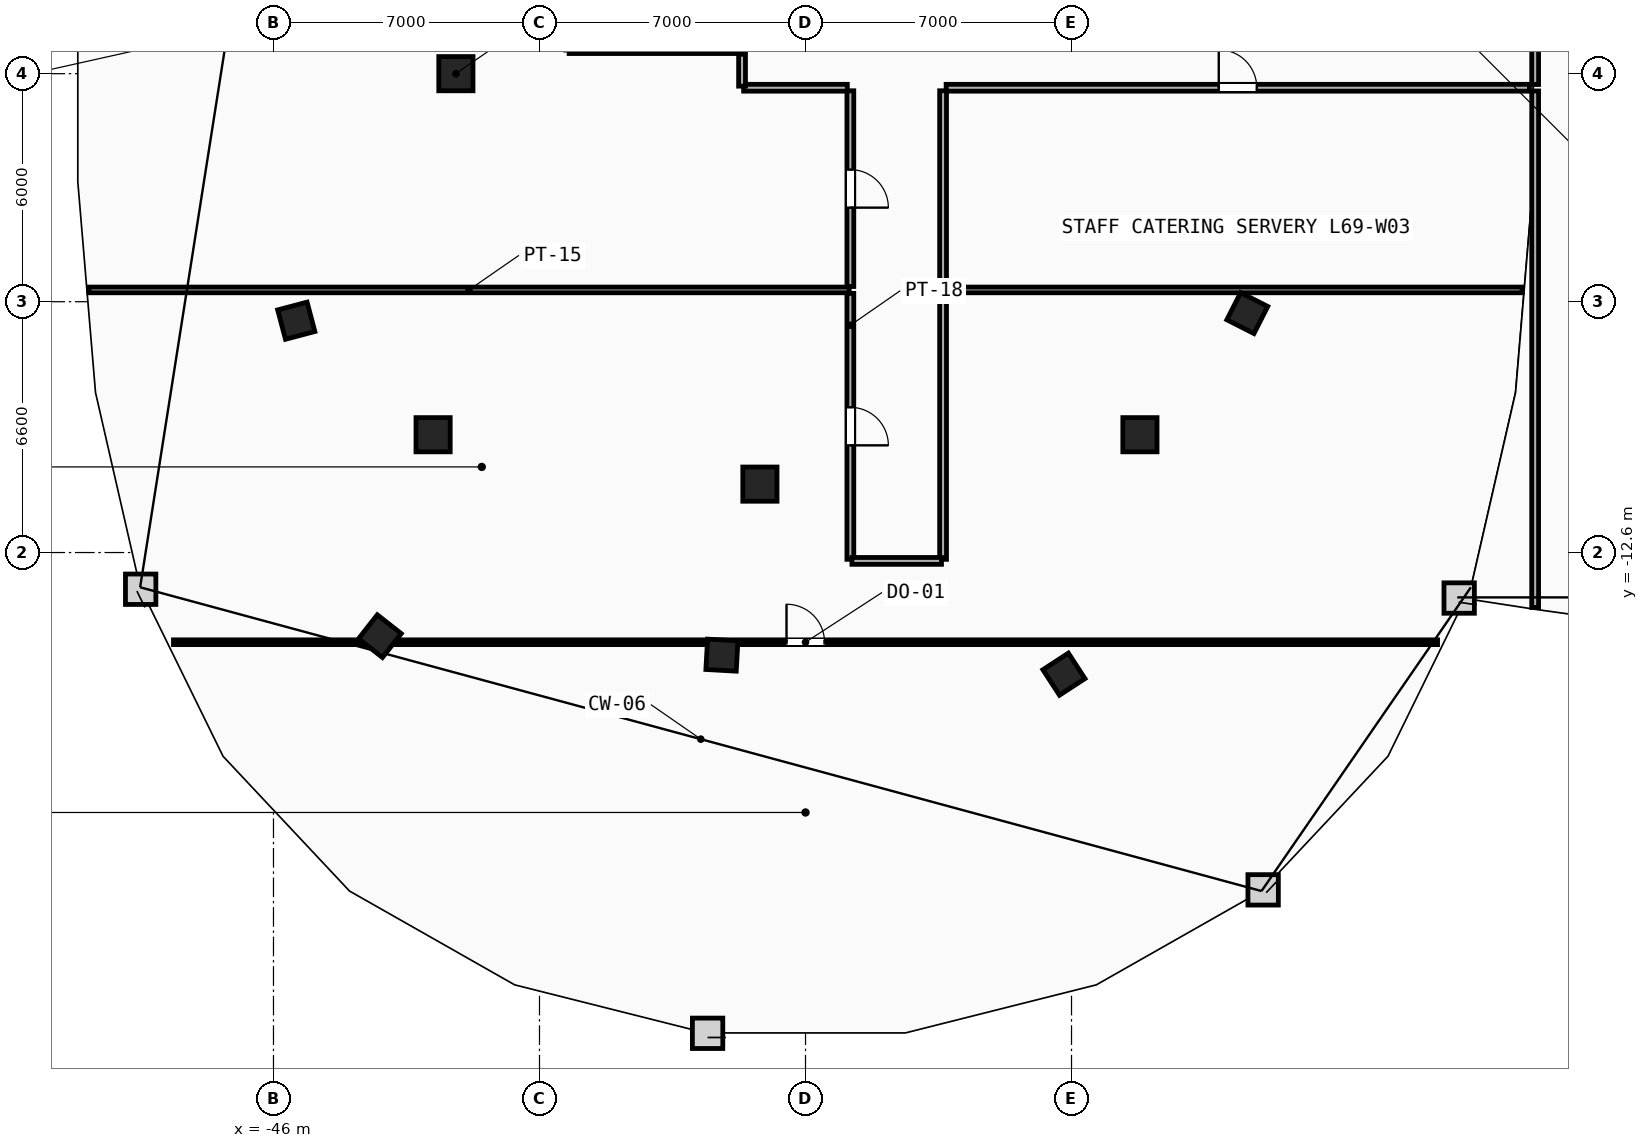
"""IFC4 building model, lengths in metres.
Left out: names, types, materials, properties, quantities, classifications, styles, units other than length and angle.
Written with IfcOpenShell. Run it as: python <this file> out.ifc"""

import sys

from ifc_helpers import new_model, si_unit, direction, frame, frame_2d, origin, origin_2d, place, context, subcontext, project, spatial, rectangle, extrude, element, fill, save


model = new_model("IFC4")
c1 = context("Model", 3, precision=1e-05, world=origin(), true_north=direction((0.0, 1.0)))
c2 = subcontext(c1, "Body", "Model", "MODEL_VIEW")
j1 = project(units=[si_unit("LENGTHUNIT", "METRE"), si_unit("PLANEANGLEUNIT", "RADIAN")], contexts=[c1])
p1 = place(None, origin())
s1 = spatial("IfcSite", under=j1, at=p1, CompositionType="ELEMENT")
p2 = place(p1, origin())
s2 = spatial("IfcBuilding", under=s1, at=p2, CompositionType="ELEMENT")
p3 = place(p2, frame((0.0, 0.0, 261.2)))
s3 = spatial("IfcBuildingStorey", under=s2, at=p3, CompositionType="ELEMENT", Elevation=261.2)
for number, where, z_axis, x_axis in (
    (1, (-41.2, 0.0, 0.0), (0.0, 0.0, 1.0), (1.0, 0.0, 0.0)),
    (2, (-41.8, -9.5, 0.0), (0.0, 0.0, 1.0), (1.0, 0.0, 0.0)),
    (3, (-33.2, -10.8, 0.0), (0.0, 0.0, 1.0), (1.0, 0.0, 0.0)),
    (4, (-23.2, -9.5, 0.0), (0.0, 0.0, 1.0), (1.0, 0.0, 0.0)),
):
    element("IfcColumn", number, at=place(p3, frame(where, z_axis=z_axis, x_axis=x_axis)), inside=s3, PredefinedType="COLUMN", context=c2, shape_type="SweptSolid", body=[
        extrude(rectangle(XDim=0.9, YDim=0.9, at=origin_2d()), origin(), (0.0, 0.0, 1.0), 3.6),
    ])
for number, where, z_axis, x_axis in (
    (5, (-45.4, -6.5, 0.0), (0.0, 0.0, 1.0), (0.256, -0.967, 0.0)),
    (6, (-43.2, -14.8, 0.0), (0.0, 0.0, 1.0), (0.786, -0.618, 0.0)),
    (7, (-34.2, -15.3, 0.0), (0.0, 0.0, 1.0), (0.998, -0.055, 0.0)),
    (8, (-25.2, -15.8, 0.0), (0.0, 0.0, 1.0), (0.838, 0.546, 0.0)),
    (9, (-20.375, -6.3, 0.0), (0.0, 0.0, 1.0), (0.453, 0.892, 0.0)),
):
    element("IfcColumn", number, at=place(p3, frame(where, z_axis=z_axis, x_axis=x_axis)), inside=s3, PredefinedType="COLUMN", context=c2, shape_type="SweptSolid", body=[
        extrude(rectangle(XDim=0.8, YDim=0.8, at=origin_2d()), origin(), (0.0, 0.0, 1.0), 3.6),
    ])
p4 = place(p3, frame((-38.22, 0.6, 0.0), z_axis=(0.0, 0.0, 1.0), x_axis=(1.0, 0.0, 0.0)))
e10 = element("IfcWall", 10, at=p4, inside=s3, PredefinedType="PARTITIONING", context=c2, shape_type="SweptSolid", body=[
    extrude(rectangle(XDim=4.48, YDim=0.14, at=frame_2d((2.24, 0.0))), origin(), (0.0, 0.0, 1.0), 3.34),
])
p5 = place(p3, frame((-50.86, -5.69, 0.0), z_axis=(0.0, 0.0, 1.0), x_axis=(1.0, 0.0, 0.0)))
e11 = element("IfcWall", 11, at=p5, inside=s3, PredefinedType="PARTITIONING", context=c2, shape_type="SweptSolid", body=[
    extrude(rectangle(XDim=20.01, YDim=0.15, at=frame_2d((10.005, 0.0))), origin(), (0.0, 0.0, 1.0), 3.34),
])
p6 = place(p3, frame((-28.35, -5.69, 0.0), z_axis=(0.0, 0.0, 1.0), x_axis=(1.0, 0.0, 0.0)))
e12 = element("IfcWall", 12, at=p6, inside=s3, PredefinedType="PARTITIONING", context=c2, shape_type="SweptSolid", body=[
    extrude(rectangle(XDim=15.21, YDim=0.15, at=frame_2d((7.605, 0.0))), origin(), (0.0, 0.0, 1.0), 3.34),
])
p7 = place(p3, frame((-30.82, -5.78, 0.0), z_axis=(0.0, 0.0, 1.0), x_axis=(0.0, -1.0, 0.0)))
e13 = element("IfcWall", 13, at=p7, inside=s3, PredefinedType="PARTITIONING", context=c2, shape_type="SweptSolid", body=[
    extrude(rectangle(XDim=6.999, YDim=0.18, at=frame_2d((3.499, 0.0))), origin(), (0.0, 0.0, 1.0), 3.34),
])
p8 = place(p7, frame((2.999, 0.0, 0.0)))
e14 = element("IfcOpeningElement", 14, at=p8, cuts=e13, PredefinedType="OPENING", context=c2, shape_type="SweptSolid", body=[
    extrude(rectangle(XDim=1.0, YDim=2.15, at=frame_2d((0.5, 1.075))), frame((0.0, 0.1, 0.0), z_axis=(0.0, -1.0, 0.0), x_axis=(1.0, 0.0, 0.0)), (0.0, 0.0, 1.0), 0.2),
])
p9 = place(p3, frame((-28.38, -12.779, 0.0), z_axis=(0.0, 0.0, 1.0), x_axis=(0.0, 1.0, 0.0)))
e15 = element("IfcWall", 15, at=p9, inside=s3, PredefinedType="PARTITIONING", context=c2, shape_type="SweptSolid", body=[
    extrude(rectangle(XDim=6.999, YDim=0.18, at=frame_2d((3.499, 0.0))), origin(), (0.0, 0.0, 1.0), 3.34),
])
p10 = place(p3, frame((-30.779, -12.82, 0.0), z_axis=(0.0, 0.0, 1.0), x_axis=(1.0, 0.0, 0.0)))
e16 = element("IfcWall", 16, at=p10, inside=s3, PredefinedType="PARTITIONING", context=c2, shape_type="SweptSolid", body=[
    extrude(rectangle(XDim=2.357, YDim=0.18, at=frame_2d((1.179, 0.0))), origin(), (0.0, 0.0, 1.0), 3.34),
])
p11 = place(p3, frame((-28.3, -0.37, 0.0), z_axis=(0.0, 0.0, 1.0), x_axis=(1.0, 0.0, 0.0)))
e17 = element("IfcWall", 17, at=p11, inside=s3, PredefinedType="PARTITIONING", context=c2, shape_type="SweptSolid", body=[
    extrude(rectangle(XDim=15.349, YDim=0.18, at=frame_2d((7.675, 0.0))), origin(), (0.0, 0.0, 1.0), 3.34),
])
p12 = place(p11, frame((7.175, 0.0, 0.0)))
e18 = element("IfcOpeningElement", 18, at=p12, cuts=e17, PredefinedType="OPENING", context=c2, shape_type="SweptSolid", body=[
    extrude(rectangle(XDim=1.0, YDim=2.15, at=frame_2d((0.5, 1.075))), frame((0.0, 0.1, 0.0), z_axis=(0.0, -1.0, 0.0), x_axis=(1.0, 0.0, 0.0)), (0.0, 0.0, 1.0), 0.2),
])
p13 = place(p3, frame((-28.38, -5.6, 0.0), z_axis=(0.0, 0.0, 1.0), x_axis=(0.0, 1.0, 0.0)))
e19 = element("IfcWall", 19, at=p13, inside=s3, PredefinedType="PARTITIONING", context=c2, shape_type="SweptSolid", body=[
    extrude(rectangle(XDim=5.15, YDim=0.18, at=frame_2d((2.575, 0.0))), origin(), (0.0, 0.0, 1.0), 3.34),
])
p14 = place(p3, frame((-30.82, -0.45, 0.0), z_axis=(0.0, 0.0, 1.0), x_axis=(0.0, -1.0, 0.0)))
e20 = element("IfcWall", 20, at=p14, inside=s3, PredefinedType="PARTITIONING", context=c2, shape_type="SweptSolid", body=[
    extrude(rectangle(XDim=5.15, YDim=0.18, at=frame_2d((2.575, 0.0))), origin(), (0.0, 0.0, 1.0), 3.34),
])
p15 = place(p14, frame((2.075, 0.0, 0.0)))
e21 = element("IfcOpeningElement", 21, at=p15, cuts=e20, PredefinedType="OPENING", context=c2, shape_type="SweptSolid", body=[
    extrude(rectangle(XDim=1.0, YDim=2.15, at=frame_2d((0.5, 1.075))), frame((0.0, 0.1, 0.0), z_axis=(0.0, -1.0, 0.0), x_axis=(1.0, 0.0, 0.0)), (0.0, 0.0, 1.0), 0.2),
])
p16 = place(p3, frame((-33.628, -0.37, 0.0), z_axis=(0.0, 0.0, 1.0), x_axis=(1.0, 0.0, 0.0)))
e22 = element("IfcWall", 22, at=p16, inside=s3, PredefinedType="PARTITIONING", context=c2, shape_type="SweptSolid", body=[
    extrude(rectangle(XDim=2.729, YDim=0.18, at=frame_2d((1.364, 0.0))), origin(), (0.0, 0.0, 1.0), 3.34),
])
p17 = place(p3, frame((-33.67, 0.509, 0.0), z_axis=(0.0, 0.0, 1.0), x_axis=(0.0, -1.0, 0.0)))
e23 = element("IfcWall", 23, at=p17, inside=s3, PredefinedType="PARTITIONING", context=c2, shape_type="SweptSolid", body=[
    extrude(rectangle(XDim=0.837, YDim=0.18, at=frame_2d((0.418, 0.0))), origin(), (0.0, 0.0, 1.0), 3.34),
])
p18 = place(p3, frame((-48.632, -14.96, 0.0), z_axis=(0.0, 0.0, 1.0), x_axis=(1.0, 0.0, 0.0)))
e24 = element("IfcWall", 24, at=p18, inside=s3, PredefinedType="PARTITIONING", context=c2, shape_type="SweptSolid", body=[
    extrude(rectangle(XDim=33.263, YDim=0.125, at=frame_2d((16.632, 0.0))), origin(), (0.0, 0.0, 1.0), 2.724),
])
p19 = place(p18, frame((16.132, 0.0, 0.0)))
e25 = element("IfcOpeningElement", 25, at=p19, cuts=e24, PredefinedType="OPENING", context=c2, shape_type="SweptSolid", body=[
    extrude(rectangle(XDim=1.0, YDim=2.15, at=frame_2d((0.5, 1.075))), frame((0.0, 0.073, 0.0), z_axis=(0.0, -1.0, 0.0), x_axis=(1.0, 0.0, 0.0)), (0.0, 0.0, 1.0), 0.145),
])
p20 = place(p3, frame((-12.8, -14.044, 0.0), z_axis=(0.0, 0.0, 1.0), x_axis=(0.0, 1.0, 0.0)))
e26 = element("IfcWall", 26, at=p20, inside=s3, PredefinedType="PARTITIONING", context=c2, shape_type="SweptSolid", body=[
    extrude(rectangle(XDim=13.589, YDim=0.18, at=frame_2d((6.794, 0.0))), origin(), (0.0, 0.0, 1.0), 3.34),
])
p21 = place(p3, frame((-12.8, -0.285, 0.0), z_axis=(0.0, 0.0, 1.0), x_axis=(0.0, 1.0, 0.0)))
e27 = element("IfcWall", 27, at=p21, inside=s3, PredefinedType="PARTITIONING", context=c2, shape_type="SweptSolid", body=[
    extrude(rectangle(XDim=1.445, YDim=0.18, at=frame_2d((0.722, 0.0))), origin(), (0.0, 0.0, 1.0), 3.34),
])
p22 = place(p19, origin())
e28 = element("IfcDoor", 28, at=p22, inside=s3, OperationType="SINGLE_SWING_LEFT", PredefinedType="DOOR", context=c2, shape_type="SweptSolid", body=[
    extrude(rectangle(XDim=1.0, YDim=2.15, at=frame_2d((0.5, 1.075))), frame((0.0, 0.025, 0.0), z_axis=(0.0, -1.0, 0.0), x_axis=(1.0, 0.0, 0.0)), (0.0, 0.0, 1.0), 0.05),
])
fill(e25, e28)
p23 = place(p12, origin())
e29 = element("IfcDoor", 29, at=p23, inside=s3, OperationType="SINGLE_SWING_LEFT", PredefinedType="DOOR", context=c2, shape_type="SweptSolid", body=[
    extrude(rectangle(XDim=1.0, YDim=2.15, at=frame_2d((0.5, 1.075))), frame((0.0, 0.025, 0.0), z_axis=(0.0, -1.0, 0.0), x_axis=(1.0, 0.0, 0.0)), (0.0, 0.0, 1.0), 0.05),
])
fill(e18, e29)
p24 = place(p8, origin())
e30 = element("IfcDoor", 30, at=p24, inside=s3, OperationType="SINGLE_SWING_RIGHT", PredefinedType="DOOR", context=c2, shape_type="SweptSolid", body=[
    extrude(rectangle(XDim=1.0, YDim=2.15, at=frame_2d((0.5, 1.075))), frame((0.0, 0.025, 0.0), z_axis=(0.0, -1.0, 0.0), x_axis=(1.0, 0.0, 0.0)), (0.0, 0.0, 1.0), 0.05),
])
fill(e14, e30)
p25 = place(p15, origin())
e31 = element("IfcDoor", 31, at=p25, inside=s3, OperationType="SINGLE_SWING_RIGHT", PredefinedType="DOOR", context=c2, shape_type="SweptSolid", body=[
    extrude(rectangle(XDim=1.0, YDim=2.15, at=frame_2d((0.5, 1.075))), frame((0.0, 0.025, 0.0), z_axis=(0.0, -1.0, 0.0), x_axis=(1.0, 0.0, 0.0)), (0.0, 0.0, 1.0), 0.05),
])
fill(e21, e31)
save(model, sys.argv[1])
